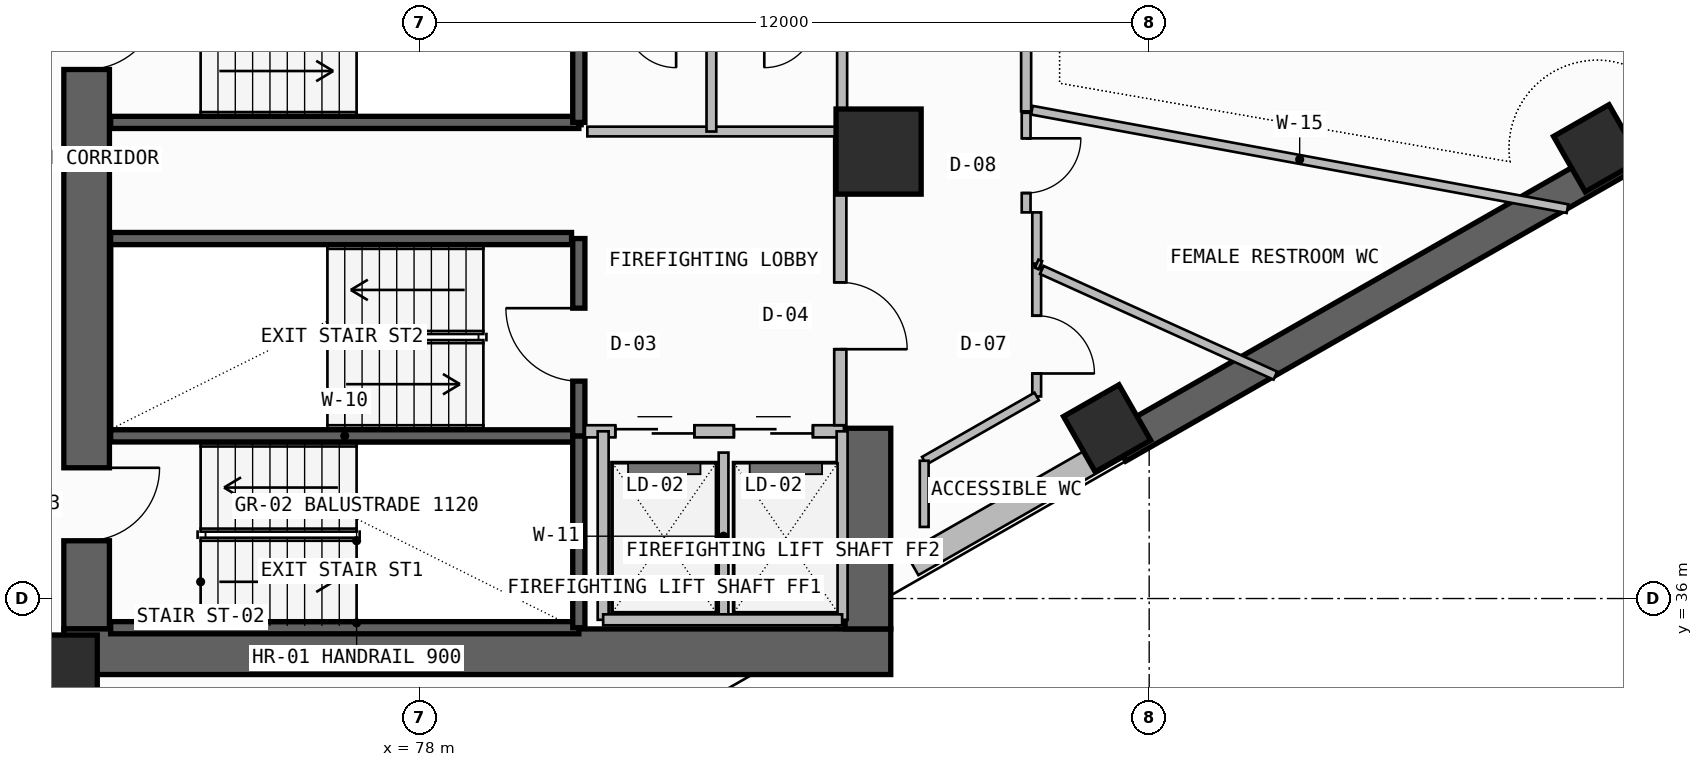
"""IFC4 building model, lengths in metres.
Left out: names, types, materials, properties, quantities, classifications, styles, units other than length and angle.
Written with IfcOpenShell. Run it as: python <this file> out.ifc"""

import sys

from ifc_helpers import new_model, si_unit, direction, frame, frame_2d, origin, origin_2d, place, context, subcontext, project, spatial, rectangle, extrude, element, fill, save


model = new_model("IFC4")
c1 = context("Model", 3, precision=1e-05, world=origin(), true_north=direction((0.0, 1.0)))
c2 = subcontext(c1, "Body", "Model", "MODEL_VIEW")
j1 = project(units=[si_unit("LENGTHUNIT", "METRE"), si_unit("PLANEANGLEUNIT", "RADIAN")], contexts=[c1])
p1 = place(None, origin())
s1 = spatial("IfcSite", under=j1, at=p1, CompositionType="ELEMENT")
p2 = place(p1, origin())
s2 = spatial("IfcBuilding", under=s1, at=p2, CompositionType="ELEMENT")
p3 = place(p2, frame((0.0, 0.0, 229.06)))
s3 = spatial("IfcBuildingStorey", under=s2, at=p3, CompositionType="ELEMENT", Elevation=229.06)
p4 = place(p3, frame((72.525, 35.5, -0.26), z_axis=(0.0, 0.0, 1.0), x_axis=(0.0, 1.0, 0.0)))
e1 = element("IfcWall", 1, at=p4, inside=s3, PredefinedType="SHEAR", context=c2, shape_type="SweptSolid", body=[
    extrude(rectangle(XDim=7.85, YDim=0.75, at=frame_2d((3.925, 0.0))), origin(), (0.0, 0.0, 1.0), 3.52),
])
p5 = place(p4, frame((1.45, 0.0, 0.26)))
e2 = element("IfcOpeningElement", 2, at=p5, cuts=e1, PredefinedType="OPENING", context=c2, shape_type="SweptSolid", body=[
    extrude(rectangle(XDim=1.2, YDim=2.2, at=frame_2d((0.6, 1.1))), frame((0.0, 0.385, 0.0), z_axis=(0.0, -1.0, 0.0), x_axis=(1.0, 0.0, 0.0)), (0.0, 0.0, 1.0), 0.77),
])
p6 = place(p3, frame((72.15, 35.125, -0.26), z_axis=(0.0, 0.0, 1.0), x_axis=(1.0, 0.0, 0.0)))
e3 = element("IfcWall", 3, at=p6, inside=s3, PredefinedType="SHEAR", context=c2, shape_type="SweptSolid", body=[
    extrude(rectangle(XDim=13.6, YDim=0.75, at=frame_2d((6.8, 0.0))), origin(), (0.0, 0.0, 1.0), 3.52),
])
p7 = place(p3, frame((85.375, 35.5, -0.26), z_axis=(0.0, 0.0, 1.0), x_axis=(0.0, 1.0, 0.0)))
e4 = element("IfcWall", 4, at=p7, inside=s3, PredefinedType="SHEAR", context=c2, shape_type="SweptSolid", body=[
    extrude(rectangle(XDim=3.3, YDim=0.75, at=frame_2d((1.65, 0.0))), origin(), (0.0, 0.0, 1.0), 3.52),
])
p8 = place(p3, frame((72.525, 43.35, -0.26), z_axis=(0.0, 0.0, 1.0), x_axis=(0.0, 1.0, 0.0)))
e5 = element("IfcWall", 5, at=p8, inside=s3, PredefinedType="SHEAR", context=c2, shape_type="SweptSolid", body=[
    extrude(rectangle(XDim=12.7, YDim=0.75, at=frame_2d((6.35, 0.0))), origin(), (0.0, 0.0, 1.0), 3.52),
])
p9 = place(p8, frame((1.35, 0.0, 0.26)))
e6 = element("IfcOpeningElement", 6, at=p9, cuts=e5, PredefinedType="OPENING", context=c2, shape_type="SweptSolid", body=[
    extrude(rectangle(XDim=1.2, YDim=2.2, at=frame_2d((0.6, 1.1))), frame((0.0, 0.385, 0.0), z_axis=(0.0, -1.0, 0.0), x_axis=(1.0, 0.0, 0.0)), (0.0, 0.0, 1.0), 0.77),
])
for number, where, z_axis, x_axis in (
    (7, (72.0, 34.7, 0.0), (0.0, 0.0, 1.0), (1.0, 0.0, 0.0)),
    (8, (85.55, 43.35, 0.0), (0.0, 0.0, 1.0), (1.0, 0.0, 0.0)),
):
    element("IfcColumn", number, at=place(p3, frame(where, z_axis=z_axis, x_axis=x_axis)), inside=s3, PredefinedType="COLUMN", context=c2, shape_type="SweptSolid", body=[
        extrude(rectangle(XDim=1.4, YDim=1.4, at=origin_2d()), origin(), (0.0, 0.0, 1.0), 3.52),
    ])
for number, where, z_axis, x_axis in (
    (9, (89.308, 38.799, 0.0), (0.0, 0.0, 1.0), (0.868, 0.496, 0.0)),
    (10, (97.367, 43.405, 0.0), (0.0, 0.0, 1.0), (0.868, 0.496, 0.0)),
):
    element("IfcColumn", number, at=place(p3, frame(where, z_axis=z_axis, x_axis=x_axis)), inside=s3, PredefinedType="COLUMN", context=c2, shape_type="SweptSolid", body=[
        extrude(rectangle(XDim=1.05, YDim=1.05, at=origin_2d()), origin(), (0.0, 0.0, 1.0), 3.52),
    ])
p10 = place(p3, frame((86.1, 36.568, 0.0), z_axis=(0.0, 0.0, 1.0), x_axis=(0.868192956745, 0.496226752461, 0.0)))
e11 = element("IfcWall", 11, at=p10, inside=s3, PredefinedType="SOLIDWALL", context=c2, shape_type="SweptSolid", body=[
    extrude(rectangle(XDim=3.892, YDim=0.42, at=frame_2d((1.946, 0.0))), origin(), (0.0, 0.0, 1.0), 2.237),
])
p11 = place(p3, frame((89.479, 38.499, -0.26), z_axis=(0.0, 0.0, 1.0), x_axis=(0.868197136736, 0.496219439123, 0.0)))
e12 = element("IfcWall", 12, at=p11, inside=s3, PredefinedType="SHEAR", context=c2, shape_type="SweptSolid", body=[
    extrude(rectangle(XDim=17.636, YDim=0.55, at=frame_2d((8.818, 0.0))), origin(), (0.0, 0.0, 1.0), 3.52),
])
p12 = place(p11, frame((11.464, 0.0, 1.1)))
e13 = element("IfcOpeningElement", 13, at=p12, cuts=e12, PredefinedType="OPENING", context=c2, shape_type="SweptSolid", body=[
    extrude(rectangle(XDim=2.4, YDim=1.2, at=frame_2d((1.2, 0.6))), frame((0.0, 0.285, 0.0), z_axis=(0.0, -1.0, 0.0), x_axis=(1.0, 0.0, 0.0)), (0.0, 0.0, 1.0), 0.57),
])
for number, where, z_axis, x_axis in (
    (14, (72.92, 35.52, -0.26), (0.0, 0.0, 1.0), (1.0, 0.0, 0.0)),
    (15, (72.92, 38.675, -0.26), (0.0, 0.0, 1.0), (1.0, 0.0, 0.0)),
):
    element("IfcWall", number, at=place(p3, frame(where, z_axis=z_axis, x_axis=x_axis)), inside=s3, PredefinedType="SOLIDWALL", context=c2, shape_type="SweptSolid", body=[
        extrude(rectangle(XDim=7.7, YDim=0.2, at=frame_2d((3.85, 0.0))), origin(), (0.0, 0.0, 1.0), 3.52),
    ])
p13 = place(p3, frame((80.62, 35.52, -0.26), z_axis=(0.0, 0.0, 1.0), x_axis=(0.0, 1.0, 0.0)))
e16 = element("IfcWall", 16, at=p13, inside=s3, PredefinedType="SOLIDWALL", context=c2, shape_type="SweptSolid", body=[
    extrude(rectangle(XDim=3.155, YDim=0.2, at=frame_2d((1.578, 0.0))), origin(), (0.0, 0.0, 1.0), 3.52),
])
p14 = place(p3, frame((80.62, 38.675, -0.26), z_axis=(0.0, 0.0, 1.0), x_axis=(0.0, 1.0, 0.0)))
e17 = element("IfcWall", 17, at=p14, inside=s3, PredefinedType="SOLIDWALL", context=c2, shape_type="SweptSolid", body=[
    extrude(rectangle(XDim=3.245, YDim=0.2, at=frame_2d((1.623, 0.0))), origin(), (0.0, 0.0, 1.0), 3.52),
])
p15 = place(p14, frame((0.9, 0.0, 0.26)))
e18 = element("IfcOpeningElement", 18, at=p15, cuts=e17, PredefinedType="OPENING", context=c2, shape_type="SweptSolid", body=[
    extrude(rectangle(XDim=1.2, YDim=2.2, at=frame_2d((0.6, 1.1))), frame((0.0, 0.11, 0.0), z_axis=(0.0, -1.0, 0.0), x_axis=(1.0, 0.0, 0.0)), (0.0, 0.0, 1.0), 0.22),
])
p16 = place(p3, frame((80.72, 38.75, 0.0), z_axis=(0.0, 0.0, 1.0), x_axis=(1.0, 0.0, 0.0)))
e19 = element("IfcWall", 19, at=p16, inside=s3, PredefinedType="SOLIDWALL", context=c2, shape_type="SweptSolid", body=[
    extrude(rectangle(XDim=4.26, YDim=0.2, at=frame_2d((2.13, 0.0))), origin(), (0.0, 0.0, 1.0), 3.26),
])
p17 = place(p16, frame((0.5, 0.0, 0.0)))
e20 = element("IfcOpeningElement", 20, at=p17, cuts=e19, PredefinedType="OPENING", context=c2, shape_type="SweptSolid", body=[
    extrude(rectangle(XDim=1.3, YDim=2.3, at=frame_2d((0.65, 1.15))), frame((0.0, 0.11, 0.0), z_axis=(0.0, -1.0, 0.0), x_axis=(1.0, 0.0, 0.0)), (0.0, 0.0, 1.0), 0.22),
])
p18 = place(p16, frame((2.45, 0.0, 0.0)))
e21 = element("IfcOpeningElement", 21, at=p18, cuts=e19, PredefinedType="OPENING", context=c2, shape_type="SweptSolid", body=[
    extrude(rectangle(XDim=1.3, YDim=2.3, at=frame_2d((0.65, 1.15))), frame((0.0, 0.11, 0.0), z_axis=(0.0, -1.0, 0.0), x_axis=(1.0, 0.0, 0.0)), (0.0, 0.0, 1.0), 0.22),
])
p19 = place(p3, frame((83.0, 35.65, 0.0), z_axis=(0.0, 0.0, 1.0), x_axis=(0.0, 1.0, 0.0)))
e22 = element("IfcWall", 22, at=p19, inside=s3, PredefinedType="PLUMBINGWALL", context=c2, shape_type="SweptSolid", body=[
    extrude(rectangle(XDim=2.75, YDim=0.16, at=frame_2d((1.375, 0.0))), origin(), (0.0, 0.0, 1.0), 3.26),
])
for number, where, z_axis, x_axis in (
    (23, (84.95, 35.65, 0.0), (0.0, 0.0, 1.0), (0.0, 1.0, 0.0)),
    (24, (81.02, 35.65, 0.0), (0.0, 0.0, 1.0), (0.0, 1.0, 0.0)),
):
    element("IfcWall", number, at=place(p3, frame(where, z_axis=z_axis, x_axis=x_axis)), inside=s3, PredefinedType="SOLIDWALL", context=c2, shape_type="SweptSolid", body=[
        extrude(rectangle(XDim=3.1, YDim=0.18, at=frame_2d((1.55, 0.0))), origin(), (0.0, 0.0, 1.0), 3.26),
    ])
p20 = place(p3, frame((81.02, 35.65, 0.0), z_axis=(0.0, 0.0, 1.0), x_axis=(1.0, 0.0, 0.0)))
e25 = element("IfcWall", 25, at=p20, inside=s3, PredefinedType="SOLIDWALL", context=c2, shape_type="SweptSolid", body=[
    extrude(rectangle(XDim=3.93, YDim=0.18, at=frame_2d((1.965, 0.0))), origin(), (0.0, 0.0, 1.0), 3.26),
])
p21 = place(p3, frame((84.92, 38.85, 0.0), z_axis=(0.0, 0.0, 1.0), x_axis=(0.0, 1.0, 0.0)))
e26 = element("IfcWall", 26, at=p21, inside=s3, PredefinedType="SOLIDWALL", context=c2, shape_type="SweptSolid", body=[
    extrude(rectangle(XDim=4.83, YDim=0.2, at=frame_2d((2.415, 0.0))), origin(), (0.0, 0.0, 1.0), 3.26),
])
p22 = place(p21, frame((1.25, 0.0, 0.0)))
e27 = element("IfcOpeningElement", 27, at=p22, cuts=e26, PredefinedType="OPENING", context=c2, shape_type="SweptSolid", body=[
    extrude(rectangle(XDim=1.1, YDim=2.2, at=frame_2d((0.55, 1.1))), frame((0.0, 0.11, 0.0), z_axis=(0.0, -1.0, 0.0), x_axis=(1.0, 0.0, 0.0)), (0.0, 0.0, 1.0), 0.22),
])
p23 = place(p3, frame((72.92, 41.92, -0.26), z_axis=(0.0, 0.0, 1.0), x_axis=(1.0, 0.0, 0.0)))
e28 = element("IfcWall", 28, at=p23, inside=s3, PredefinedType="SOLIDWALL", context=c2, shape_type="SweptSolid", body=[
    extrude(rectangle(XDim=7.58, YDim=0.2, at=frame_2d((3.79, 0.0))), origin(), (0.0, 0.0, 1.0), 3.52),
])
p24 = place(p3, frame((72.92, 43.83, -0.26), z_axis=(0.0, 0.0, 1.0), x_axis=(1.0, 0.0, 0.0)))
e29 = element("IfcWall", 29, at=p24, inside=s3, PredefinedType="SOLIDWALL", context=c2, shape_type="SweptSolid", body=[
    extrude(rectangle(XDim=7.7, YDim=0.2, at=frame_2d((3.85, 0.0))), origin(), (0.0, 0.0, 1.0), 3.52),
])
p25 = place(p3, frame((80.62, 43.83, -0.26), z_axis=(0.0, 0.0, 1.0), x_axis=(0.0, 1.0, 0.0)))
e30 = element("IfcWall", 30, at=p25, inside=s3, PredefinedType="SOLIDWALL", context=c2, shape_type="SweptSolid", body=[
    extrude(rectangle(XDim=3.24, YDim=0.2, at=frame_2d((1.62, 0.0))), origin(), (0.0, 0.0, 1.0), 3.52),
])
p26 = place(p3, frame((84.95, 43.68, 0.0), z_axis=(0.0, 0.0, 1.0), x_axis=(0.0, 1.0, 0.0)))
e31 = element("IfcWall", 31, at=p26, inside=s3, PredefinedType="PLUMBINGWALL", context=c2, shape_type="SweptSolid", body=[
    extrude(rectangle(XDim=1.9, YDim=0.165, at=frame_2d((0.95, 0.0))), origin(), (0.0, 0.0, 1.0), 3.26),
])
p27 = place(p3, frame((80.76, 43.68, 0.0), z_axis=(0.0, 0.0, 1.0), x_axis=(1.0, 0.0, 0.0)))
e32 = element("IfcWall", 32, at=p27, inside=s3, PredefinedType="PLUMBINGWALL", context=c2, shape_type="SweptSolid", body=[
    extrude(rectangle(XDim=4.19, YDim=0.16, at=frame_2d((2.095, 0.0))), origin(), (0.0, 0.0, 1.0), 3.26),
])
p28 = place(p3, frame((82.8, 43.68, 0.0), z_axis=(0.0, 0.0, 1.0), x_axis=(0.0, 1.0, 0.0)))
e33 = element("IfcWall", 33, at=p28, inside=s3, PredefinedType="PLUMBINGWALL", context=c2, shape_type="SweptSolid", body=[
    extrude(rectangle(XDim=1.9, YDim=0.16, at=frame_2d((0.95, 0.0))), origin(), (0.0, 0.0, 1.0), 3.26),
])
p29 = place(p3, frame((88.15, 39.323, 0.0), z_axis=(0.0, 0.0, 1.0), x_axis=(0.0, 1.0, 0.0)))
e34 = element("IfcWall", 34, at=p29, inside=s3, PredefinedType="PARTITIONING", context=c2, shape_type="SweptSolid", body=[
    extrude(rectangle(XDim=2.158, YDim=0.145, at=frame_2d((1.079, 0.0))), origin(), (0.0, 0.0, 1.0), 2.237),
])
p30 = place(p29, frame((0.378, 0.0, 0.0)))
e35 = element("IfcOpeningElement", 35, at=p30, cuts=e34, PredefinedType="OPENING", context=c2, shape_type="SweptSolid", body=[
    extrude(rectangle(XDim=0.95, YDim=2.15, at=frame_2d((0.475, 1.075))), frame((0.0, 0.083, 0.0), z_axis=(0.0, -1.0, 0.0), x_axis=(1.0, 0.0, 0.0)), (0.0, 0.0, 1.0), 0.165),
])
p31 = place(p3, frame((86.3, 38.266, 0.0), z_axis=(0.0, 0.0, 1.0), x_axis=(0.868179674817, 0.496249989657, 0.0)))
e36 = element("IfcWall", 36, at=p31, inside=s3, PredefinedType="PARTITIONING", context=c2, shape_type="SweptSolid", body=[
    extrude(rectangle(XDim=2.131, YDim=0.145, at=frame_2d((1.065, 0.0))), origin(), (0.0, 0.0, 1.0), 3.26),
])
p32 = place(p3, frame((88.235, 41.404, 0.0), z_axis=(0.0, 0.0, 1.0), x_axis=(0.911094976198, -0.412196487547, 0.0)))
e37 = element("IfcWall", 37, at=p32, inside=s3, PredefinedType="PARTITIONING", context=c2, shape_type="SweptSolid", body=[
    extrude(rectangle(XDim=4.215, YDim=0.145, at=frame_2d((2.108, 0.0))), origin(), (0.0, 0.0, 1.0), 2.237),
])
p33 = place(p3, frame((87.976, 44.012, 0.0), z_axis=(0.0, 0.0, 1.0), x_axis=(0.0, 1.0, 0.0)))
e38 = element("IfcWall", 38, at=p33, inside=s3, PredefinedType="PARTITIONING", context=c2, shape_type="SweptSolid", body=[
    extrude(rectangle(XDim=1.638, YDim=0.165, at=frame_2d((0.819, 0.0))), origin(), (0.0, 0.0, 1.0), 3.26),
])
p34 = place(p3, frame((96.879, 42.412, 0.0), z_axis=(0.0, 0.0, 1.0), x_axis=(-0.983532335891, 0.18073224465, 0.0)))
e39 = element("IfcWall", 39, at=p34, inside=s3, PredefinedType="PARTITIONING", context=c2, shape_type="SweptSolid", body=[
    extrude(rectangle(XDim=8.956, YDim=0.145, at=frame_2d((4.478, 0.0))), origin(), (0.0, 0.0, 1.0), 2.237),
])
p35 = place(p3, frame((87.976, 42.35, 0.0), z_axis=(0.0, 0.0, 1.0), x_axis=(0.0, 1.0, 0.0)))
e40 = element("IfcWall", 40, at=p35, inside=s3, PredefinedType="PARTITIONING", context=c2, shape_type="SweptSolid", body=[
    extrude(rectangle(XDim=1.638, YDim=0.145, at=frame_2d((0.819, 0.0))), origin(), (0.0, 0.0, 1.0), 2.237),
])
p36 = place(p35, frame((0.318, 0.0, 0.0)))
e41 = element("IfcOpeningElement", 41, at=p36, cuts=e40, PredefinedType="OPENING", context=c2, shape_type="SweptSolid", body=[
    extrude(rectangle(XDim=0.9, YDim=2.1, at=frame_2d((0.45, 1.05))), frame((0.0, 0.083, 0.0), z_axis=(0.0, -1.0, 0.0), x_axis=(1.0, 0.0, 0.0)), (0.0, 0.0, 1.0), 0.165),
])
p37 = place(p3, frame((88.15, 41.507, 0.0), z_axis=(0.0, 0.0, 1.0), x_axis=(0.0, 1.0, 0.0)))
e42 = element("IfcWall", 42, at=p37, inside=s3, PredefinedType="PARTITIONING", context=c2, shape_type="SweptSolid", body=[
    extrude(rectangle(XDim=0.843, YDim=0.145, at=frame_2d((0.421, 0.0))), origin(), (0.0, 0.0, 1.0), 2.237),
])
p38 = place(p3, frame((88.21, 41.481, 0.0), z_axis=(0.0, 0.0, 1.0), x_axis=(-0.91641468621, 0.400230087447, 0.0)))
e43 = element("IfcWall", 43, at=p38, inside=s3, PredefinedType="PARTITIONING", context=c2, shape_type="SweptSolid", body=[
    extrude(rectangle(XDim=0.065, YDim=0.145, at=frame_2d((0.033, 0.0))), origin(), (0.0, 0.0, 1.0), 2.237),
])
p39 = place(p3, frame((86.3, 37.177, 0.0), z_axis=(0.0, 0.0, 1.0), x_axis=(0.0, 1.0, 0.0)))
e44 = element("IfcWall", 44, at=p39, inside=s3, PredefinedType="PARTITIONING", context=c2, shape_type="SweptSolid", body=[
    extrude(rectangle(XDim=1.088, YDim=0.145, at=frame_2d((0.544, 0.0))), origin(), (0.0, 0.0, 1.0), 3.26),
])
p40 = place(p5, frame((1.2, 0.0, 0.0), z_axis=(0.0, 0.0, 1.0), x_axis=(-1.0, 0.0, 0.0)))
e45 = element("IfcDoor", 45, at=p40, inside=s3, OperationType="SINGLE_SWING_LEFT", PredefinedType="USERDEFINED", context=c2, shape_type="SweptSolid", body=[
    extrude(rectangle(XDim=1.2, YDim=2.2, at=frame_2d((0.6, 1.1))), frame((0.0, 0.025, 0.0), z_axis=(0.0, -1.0, 0.0), x_axis=(1.0, 0.0, 0.0)), (0.0, 0.0, 1.0), 0.05),
])
fill(e2, e45)
p41 = place(p15, origin())
e46 = element("IfcDoor", 46, at=p41, inside=s3, OperationType="SINGLE_SWING_RIGHT", PredefinedType="USERDEFINED", context=c2, shape_type="SweptSolid", body=[
    extrude(rectangle(XDim=1.2, YDim=2.2, at=frame_2d((0.6, 1.1))), frame((0.0, 0.025, 0.0), z_axis=(0.0, -1.0, 0.0), x_axis=(1.0, 0.0, 0.0)), (0.0, 0.0, 1.0), 0.05),
])
fill(e18, e46)
p42 = place(p17, origin())
e47 = element("IfcDoor", 47, at=p42, inside=s3, OperationType="DOUBLE_DOOR_SLIDING", PredefinedType="DOOR", context=c2, shape_type="SweptSolid", body=[
    extrude(rectangle(XDim=1.3, YDim=2.3, at=frame_2d((0.65, 1.15))), frame((0.0, 0.025, 0.0), z_axis=(0.0, -1.0, 0.0), x_axis=(1.0, 0.0, 0.0)), (0.0, 0.0, 1.0), 0.05),
])
fill(e20, e47)
p43 = place(p18, origin())
e48 = element("IfcDoor", 48, at=p43, inside=s3, OperationType="DOUBLE_DOOR_SLIDING", PredefinedType="DOOR", context=c2, shape_type="SweptSolid", body=[
    extrude(rectangle(XDim=1.3, YDim=2.3, at=frame_2d((0.65, 1.15))), frame((0.0, 0.025, 0.0), z_axis=(0.0, -1.0, 0.0), x_axis=(1.0, 0.0, 0.0)), (0.0, 0.0, 1.0), 0.05),
])
fill(e21, e48)
p44 = place(p22, frame((1.1, 0.0, 0.0), z_axis=(0.0, 0.0, 1.0), x_axis=(-1.0, 0.0, 0.0)))
e49 = element("IfcDoor", 49, at=p44, inside=s3, OperationType="SINGLE_SWING_RIGHT", PredefinedType="DOOR", context=c2, shape_type="SweptSolid", body=[
    extrude(rectangle(XDim=1.1, YDim=2.2, at=frame_2d((0.55, 1.1))), frame((0.0, 0.025, 0.0), z_axis=(0.0, -1.0, 0.0), x_axis=(1.0, 0.0, 0.0)), (0.0, 0.0, 1.0), 0.05),
])
fill(e27, e49)
p45 = place(p9, frame((1.2, 0.0, 0.0), z_axis=(0.0, 0.0, 1.0), x_axis=(-1.0, 0.0, 0.0)))
e50 = element("IfcDoor", 50, at=p45, inside=s3, OperationType="SINGLE_SWING_LEFT", PredefinedType="USERDEFINED", context=c2, shape_type="SweptSolid", body=[
    extrude(rectangle(XDim=1.2, YDim=2.2, at=frame_2d((0.6, 1.1))), frame((0.0, 0.025, 0.0), z_axis=(0.0, -1.0, 0.0), x_axis=(1.0, 0.0, 0.0)), (0.0, 0.0, 1.0), 0.05),
])
fill(e6, e50)
p46 = place(p30, frame((0.95, 0.0, 0.0), z_axis=(0.0, 0.0, 1.0), x_axis=(-1.0, 0.0, 0.0)))
e51 = element("IfcDoor", 51, at=p46, inside=s3, OperationType="SINGLE_SWING_RIGHT", PredefinedType="DOOR", context=c2, shape_type="SweptSolid", body=[
    extrude(rectangle(XDim=0.95, YDim=2.15, at=frame_2d((0.475, 1.075))), frame((0.0, 0.025, 0.0), z_axis=(0.0, -1.0, 0.0), x_axis=(1.0, 0.0, 0.0)), (0.0, 0.0, 1.0), 0.05),
])
fill(e35, e51)
p47 = place(p36, frame((0.9, 0.0, 0.0), z_axis=(0.0, 0.0, 1.0), x_axis=(-1.0, 0.0, 0.0)))
e52 = element("IfcDoor", 52, at=p47, inside=s3, OperationType="SINGLE_SWING_LEFT", PredefinedType="DOOR", context=c2, shape_type="SweptSolid", body=[
    extrude(rectangle(XDim=0.9, YDim=2.1, at=frame_2d((0.45, 1.05))), frame((0.0, 0.025, 0.0), z_axis=(0.0, -1.0, 0.0), x_axis=(1.0, 0.0, 0.0)), (0.0, 0.0, 1.0), 0.05),
])
fill(e41, e52)
save(model, sys.argv[1])
